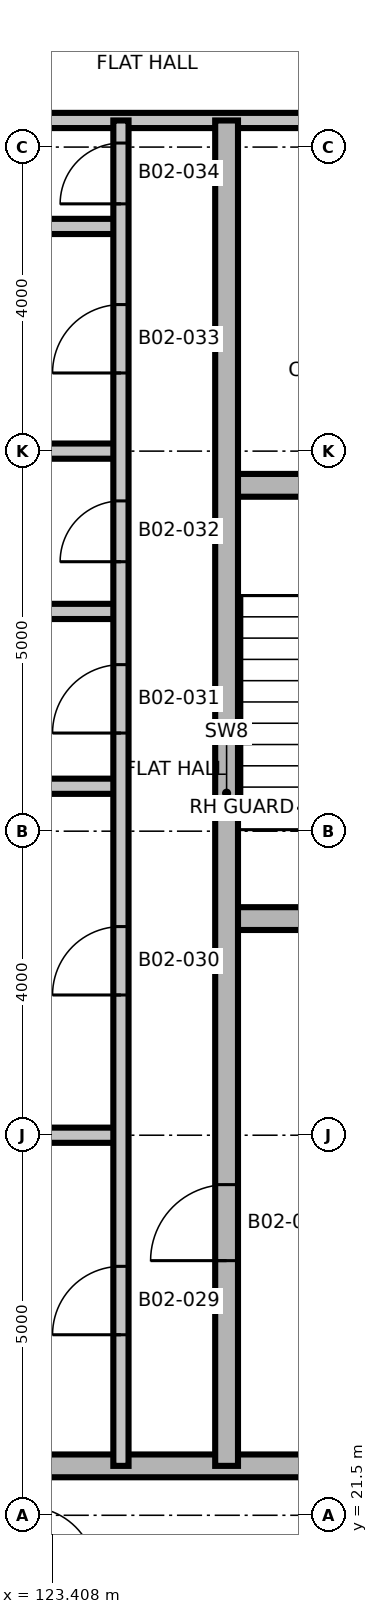
"""IFC4 building model, lengths in metres.
Left out: names, types, materials, properties, quantities, classifications, styles, units other than length and angle.
Written with IfcOpenShell. Run it as: python <this file> out.ifc"""

import sys

from ifc_helpers import new_model, si_unit, direction, frame, frame_2d, origin, place, context, subcontext, project, spatial, rectangle, extrude, element, fill, save


model = new_model("IFC4")
c1 = context("Model", 3, precision=1e-05, world=origin(), true_north=direction((0.0, 1.0)))
c2 = subcontext(c1, "Body", "Model", "MODEL_VIEW")
j1 = project(units=[si_unit("LENGTHUNIT", "METRE"), si_unit("PLANEANGLEUNIT", "RADIAN")], contexts=[c1])
p1 = place(None, origin())
s1 = spatial("IfcSite", under=j1, at=p1, CompositionType="ELEMENT")
p2 = place(p1, origin())
s2 = spatial("IfcBuilding", under=s1, at=p2, CompositionType="ELEMENT")
p3 = place(p2, frame((0.0, 0.0, 48.3)))
s3 = spatial("IfcBuildingStorey", under=s2, at=p3, CompositionType="ELEMENT", Elevation=48.3)
p4 = place(p3, frame((120.235, 22.15, 0.0), z_axis=(0.0, 0.0, 1.0), x_axis=(1.0, 0.0, 0.0)))
e1 = element("IfcWall", 1, at=p4, inside=s3, PredefinedType="SHEAR", context=c2, shape_type="SweptSolid", body=[
    extrude(rectangle(XDim=32.53, YDim=0.3, at=frame_2d((16.265, 0.0))), origin(), (0.0, 0.0, 1.0), 3.4),
])
p5 = place(p4, frame((22.515, 0.0, 0.0)))
e2 = element("IfcOpeningElement", 2, at=p5, cuts=e1, PredefinedType="OPENING", context=c2, shape_type="SweptSolid", body=[
    extrude(rectangle(XDim=1.0, YDim=2.1, at=frame_2d((0.5, 1.05))), frame((0.0, 0.16, 0.0), z_axis=(0.0, -1.0, 0.0), x_axis=(1.0, 0.0, 0.0)), (0.0, 0.0, 1.0), 0.32),
])
p6 = place(p4, frame((10.865, 0.0, 0.0)))
e3 = element("IfcOpeningElement", 3, at=p6, cuts=e1, PredefinedType="OPENING", context=c2, shape_type="SweptSolid", body=[
    extrude(rectangle(XDim=1.0, YDim=2.1, at=frame_2d((0.5, 1.05))), frame((0.0, 0.16, 0.0), z_axis=(0.0, -1.0, 0.0), x_axis=(1.0, 0.0, 0.0)), (0.0, 0.0, 1.0), 0.32),
])
p7 = place(p4, frame((24.415, 0.0, 0.0)))
e4 = element("IfcOpeningElement", 4, at=p7, cuts=e1, PredefinedType="OPENING", context=c2, shape_type="SweptSolid", body=[
    extrude(rectangle(XDim=1.0, YDim=2.1, at=frame_2d((0.5, 1.05))), frame((0.0, 0.16, 0.0), z_axis=(0.0, -1.0, 0.0), x_axis=(1.0, 0.0, 0.0)), (0.0, 0.0, 1.0), 0.32),
])
p8 = place(p4, frame((16.515, 0.0, 0.0)))
e5 = element("IfcOpeningElement", 5, at=p8, cuts=e1, PredefinedType="OPENING", context=c2, shape_type="SweptSolid", body=[
    extrude(rectangle(XDim=0.9, YDim=2.1, at=frame_2d((0.45, 1.05))), frame((0.0, 0.16, 0.0), z_axis=(0.0, -1.0, 0.0), x_axis=(1.0, 0.0, 0.0)), (0.0, 0.0, 1.0), 0.32),
])
p9 = place(p3, frame((120.235, 26.5, 0.0), z_axis=(0.0, 0.0, 1.0), x_axis=(1.0, 0.0, 0.0)))
e6 = element("IfcWall", 6, at=p9, inside=s3, PredefinedType="PARTITIONING", context=c2, shape_type="SweptSolid", body=[
    extrude(rectangle(XDim=4.075, YDim=0.2, at=frame_2d((2.038, 0.0))), origin(), (0.0, 0.0, 1.0), 3.4),
])
p10 = place(p3, frame((125.7, 29.35, 0.0), z_axis=(0.0, 0.0, 1.0), x_axis=(1.0, 0.0, 0.0)))
e7 = element("IfcWall", 7, at=p10, inside=s3, PredefinedType="SHEAR", context=c2, shape_type="SweptSolid", body=[
    extrude(rectangle(XDim=2.83, YDim=0.3, at=frame_2d((1.415, 0.0))), origin(), (0.0, 0.0, 1.0), 3.4),
])
p11 = place(p10, frame((0.975, 0.0, 0.0)))
e8 = element("IfcOpeningElement", 8, at=p11, cuts=e7, PredefinedType="OPENING", context=c2, shape_type="SweptSolid", body=[
    extrude(rectangle(XDim=1.2, YDim=2.1, at=frame_2d((0.6, 1.05))), frame((0.0, 0.16, 0.0), z_axis=(0.0, -1.0, 0.0), x_axis=(1.0, 0.0, 0.0)), (0.0, 0.0, 1.0), 0.32),
])
for number, where, z_axis, x_axis in (
    (9, (120.235, 31.091, 0.0), (0.0, 0.0, 1.0), (1.0, 0.0, 0.0)),
    (10, (120.235, 33.391, 0.0), (0.0, 0.0, 1.0), (1.0, 0.0, 0.0)),
):
    element("IfcWall", number, at=place(p3, frame(where, z_axis=z_axis, x_axis=x_axis)), inside=s3, PredefinedType="PARTITIONING", context=c2, shape_type="SweptSolid", body=[
        extrude(rectangle(XDim=4.075, YDim=0.2, at=frame_2d((2.038, 0.0))), origin(), (0.0, 0.0, 1.0), 3.4),
    ])
p12 = place(p3, frame((125.7, 35.05, 0.0), z_axis=(0.0, 0.0, 1.0), x_axis=(1.0, 0.0, 0.0)))
e11 = element("IfcWall", 11, at=p12, inside=s3, PredefinedType="SHEAR", context=c2, shape_type="SweptSolid", body=[
    extrude(rectangle(XDim=2.83, YDim=0.3, at=frame_2d((1.415, 0.0))), origin(), (0.0, 0.0, 1.0), 3.4),
])
for number, where, z_axis, x_axis in (
    (12, (120.235, 35.5, 0.0), (0.0, 0.0, 1.0), (1.0, 0.0, 0.0)),
    (13, (120.235, 38.456, 0.0), (0.0, 0.0, 1.0), (1.0, 0.0, 0.0)),
):
    element("IfcWall", number, at=place(p3, frame(where, z_axis=z_axis, x_axis=x_axis)), inside=s3, PredefinedType="PARTITIONING", context=c2, shape_type="SweptSolid", body=[
        extrude(rectangle(XDim=4.075, YDim=0.2, at=frame_2d((2.038, 0.0))), origin(), (0.0, 0.0, 1.0), 3.4),
    ])
p13 = place(p3, frame((120.235, 39.85, 0.0), z_axis=(0.0, 0.0, 1.0), x_axis=(1.0, 0.0, 0.0)))
e14 = element("IfcWall", 14, at=p13, inside=s3, PredefinedType="PARTITIONING", context=c2, shape_type="SweptSolid", body=[
    extrude(rectangle(XDim=32.53, YDim=0.2, at=frame_2d((16.265, 0.0))), origin(), (0.0, 0.0, 1.0), 3.4),
])
p14 = place(p13, frame((7.115, 0.0, 0.0)))
e15 = element("IfcOpeningElement", 15, at=p14, cuts=e14, PredefinedType="OPENING", context=c2, shape_type="SweptSolid", body=[
    extrude(rectangle(XDim=1.0, YDim=2.1, at=frame_2d((0.5, 1.05))), frame((0.0, 0.11, 0.0), z_axis=(0.0, -1.0, 0.0), x_axis=(1.0, 0.0, 0.0)), (0.0, 0.0, 1.0), 0.22),
])
p15 = place(p13, frame((15.765, 0.0, 0.0)))
e16 = element("IfcOpeningElement", 16, at=p15, cuts=e14, PredefinedType="OPENING", context=c2, shape_type="SweptSolid", body=[
    extrude(rectangle(XDim=1.0, YDim=2.1, at=frame_2d((0.5, 1.05))), frame((0.0, 0.11, 0.0), z_axis=(0.0, -1.0, 0.0), x_axis=(1.0, 0.0, 0.0)), (0.0, 0.0, 1.0), 0.22),
])
p16 = place(p13, frame((24.415, 0.0, 0.0)))
e17 = element("IfcOpeningElement", 17, at=p16, cuts=e14, PredefinedType="OPENING", context=c2, shape_type="SweptSolid", body=[
    extrude(rectangle(XDim=1.0, YDim=2.1, at=frame_2d((0.5, 1.05))), frame((0.0, 0.11, 0.0), z_axis=(0.0, -1.0, 0.0), x_axis=(1.0, 0.0, 0.0)), (0.0, 0.0, 1.0), 0.22),
])
p17 = place(p3, frame((124.31, 22.15, 0.0), z_axis=(0.0, 0.0, 1.0), x_axis=(0.0, 1.0, 0.0)))
e18 = element("IfcWall", 18, at=p17, inside=s3, PredefinedType="PARTITIONING", context=c2, shape_type="SweptSolid", body=[
    extrude(rectangle(XDim=17.7, YDim=0.2, at=frame_2d((8.85, 0.0))), origin(), (0.0, 0.0, 1.0), 3.4),
])
p18 = place(p17, frame((1.725, 0.0, 0.0)))
e19 = element("IfcOpeningElement", 19, at=p18, cuts=e18, PredefinedType="OPENING", context=c2, shape_type="SweptSolid", body=[
    extrude(rectangle(XDim=0.9, YDim=2.1, at=frame_2d((0.45, 1.05))), frame((0.0, 0.11, 0.0), z_axis=(0.0, -1.0, 0.0), x_axis=(1.0, 0.0, 0.0)), (0.0, 0.0, 1.0), 0.22),
])
p19 = place(p17, frame((6.195, 0.0, 0.0)))
e20 = element("IfcOpeningElement", 20, at=p19, cuts=e18, PredefinedType="OPENING", context=c2, shape_type="SweptSolid", body=[
    extrude(rectangle(XDim=0.9, YDim=2.1, at=frame_2d((0.45, 1.05))), frame((0.0, 0.11, 0.0), z_axis=(0.0, -1.0, 0.0), x_axis=(1.0, 0.0, 0.0)), (0.0, 0.0, 1.0), 0.22),
])
p20 = place(p17, frame((9.641, 0.0, 0.0)))
e21 = element("IfcOpeningElement", 21, at=p20, cuts=e18, PredefinedType="OPENING", context=c2, shape_type="SweptSolid", body=[
    extrude(rectangle(XDim=0.9, YDim=2.1, at=frame_2d((0.45, 1.05))), frame((0.0, 0.11, 0.0), z_axis=(0.0, -1.0, 0.0), x_axis=(1.0, 0.0, 0.0)), (0.0, 0.0, 1.0), 0.22),
])
p21 = place(p17, frame((11.895, 0.0, 0.0)))
e22 = element("IfcOpeningElement", 22, at=p21, cuts=e18, PredefinedType="OPENING", context=c2, shape_type="SweptSolid", body=[
    extrude(rectangle(XDim=0.8, YDim=2.1, at=frame_2d((0.4, 1.05))), frame((0.0, 0.11, 0.0), z_axis=(0.0, -1.0, 0.0), x_axis=(1.0, 0.0, 0.0)), (0.0, 0.0, 1.0), 0.22),
])
p22 = place(p17, frame((14.378, 0.0, 0.0)))
e23 = element("IfcOpeningElement", 23, at=p22, cuts=e18, PredefinedType="OPENING", context=c2, shape_type="SweptSolid", body=[
    extrude(rectangle(XDim=0.9, YDim=2.1, at=frame_2d((0.45, 1.05))), frame((0.0, 0.11, 0.0), z_axis=(0.0, -1.0, 0.0), x_axis=(1.0, 0.0, 0.0)), (0.0, 0.0, 1.0), 0.22),
])
p23 = place(p17, frame((16.603, 0.0, 0.0)))
e24 = element("IfcOpeningElement", 24, at=p23, cuts=e18, PredefinedType="OPENING", context=c2, shape_type="SweptSolid", body=[
    extrude(rectangle(XDim=0.8, YDim=2.1, at=frame_2d((0.4, 1.05))), frame((0.0, 0.11, 0.0), z_axis=(0.0, -1.0, 0.0), x_axis=(1.0, 0.0, 0.0)), (0.0, 0.0, 1.0), 0.22),
])
p24 = place(p3, frame((125.7, 22.15, 0.0), z_axis=(0.0, 0.0, 1.0), x_axis=(0.0, 1.0, 0.0)))
e25 = element("IfcWall", 25, at=p24, inside=s3, PredefinedType="SHEAR", context=c2, shape_type="SweptSolid", body=[
    extrude(rectangle(XDim=17.7, YDim=0.3, at=frame_2d((8.85, 0.0))), origin(), (0.0, 0.0, 1.0), 3.4),
])
p25 = place(p24, frame((2.7, 0.0, 0.0)))
e26 = element("IfcOpeningElement", 26, at=p25, cuts=e25, PredefinedType="OPENING", context=c2, shape_type="SweptSolid", body=[
    extrude(rectangle(XDim=1.0, YDim=2.1, at=frame_2d((0.5, 1.05))), frame((0.0, 0.16, 0.0), z_axis=(0.0, -1.0, 0.0), x_axis=(1.0, 0.0, 0.0)), (0.0, 0.0, 1.0), 0.32),
])
p26 = place(p25, origin())
e27 = element("IfcDoor", 27, at=p26, inside=s3, OperationType="SINGLE_SWING_RIGHT", PredefinedType="DOOR", context=c2, shape_type="SweptSolid", body=[
    extrude(rectangle(XDim=1.0, YDim=2.1, at=frame_2d((0.5, 1.05))), frame((0.0, 0.025, 0.0), z_axis=(0.0, -1.0, 0.0), x_axis=(1.0, 0.0, 0.0)), (0.0, 0.0, 1.0), 0.05),
])
fill(e26, e27)
p27 = place(p18, origin())
e28 = element("IfcDoor", 28, at=p27, inside=s3, OperationType="SINGLE_SWING_LEFT", PredefinedType="DOOR", context=c2, shape_type="SweptSolid", body=[
    extrude(rectangle(XDim=0.9, YDim=2.1, at=frame_2d((0.45, 1.05))), frame((0.0, 0.025, 0.0), z_axis=(0.0, -1.0, 0.0), x_axis=(1.0, 0.0, 0.0)), (0.0, 0.0, 1.0), 0.05),
])
fill(e19, e28)
p28 = place(p19, origin())
e29 = element("IfcDoor", 29, at=p28, inside=s3, OperationType="SINGLE_SWING_RIGHT", PredefinedType="DOOR", context=c2, shape_type="SweptSolid", body=[
    extrude(rectangle(XDim=0.9, YDim=2.1, at=frame_2d((0.45, 1.05))), frame((0.0, 0.025, 0.0), z_axis=(0.0, -1.0, 0.0), x_axis=(1.0, 0.0, 0.0)), (0.0, 0.0, 1.0), 0.05),
])
fill(e20, e29)
p29 = place(p20, origin())
e30 = element("IfcDoor", 30, at=p29, inside=s3, OperationType="SINGLE_SWING_LEFT", PredefinedType="DOOR", context=c2, shape_type="SweptSolid", body=[
    extrude(rectangle(XDim=0.9, YDim=2.1, at=frame_2d((0.45, 1.05))), frame((0.0, 0.025, 0.0), z_axis=(0.0, -1.0, 0.0), x_axis=(1.0, 0.0, 0.0)), (0.0, 0.0, 1.0), 0.05),
])
fill(e21, e30)
p30 = place(p21, origin())
e31 = element("IfcDoor", 31, at=p30, inside=s3, OperationType="SINGLE_SWING_RIGHT", PredefinedType="DOOR", context=c2, shape_type="SweptSolid", body=[
    extrude(rectangle(XDim=0.8, YDim=2.1, at=frame_2d((0.4, 1.05))), frame((0.0, 0.025, 0.0), z_axis=(0.0, -1.0, 0.0), x_axis=(1.0, 0.0, 0.0)), (0.0, 0.0, 1.0), 0.05),
])
fill(e22, e31)
p31 = place(p22, origin())
e32 = element("IfcDoor", 32, at=p31, inside=s3, OperationType="SINGLE_SWING_LEFT", PredefinedType="DOOR", context=c2, shape_type="SweptSolid", body=[
    extrude(rectangle(XDim=0.9, YDim=2.1, at=frame_2d((0.45, 1.05))), frame((0.0, 0.025, 0.0), z_axis=(0.0, -1.0, 0.0), x_axis=(1.0, 0.0, 0.0)), (0.0, 0.0, 1.0), 0.05),
])
fill(e23, e32)
p32 = place(p23, origin())
e33 = element("IfcDoor", 33, at=p32, inside=s3, OperationType="SINGLE_SWING_RIGHT", PredefinedType="DOOR", context=c2, shape_type="SweptSolid", body=[
    extrude(rectangle(XDim=0.8, YDim=2.1, at=frame_2d((0.4, 1.05))), frame((0.0, 0.025, 0.0), z_axis=(0.0, -1.0, 0.0), x_axis=(1.0, 0.0, 0.0)), (0.0, 0.0, 1.0), 0.05),
])
fill(e24, e33)
save(model, sys.argv[1])
